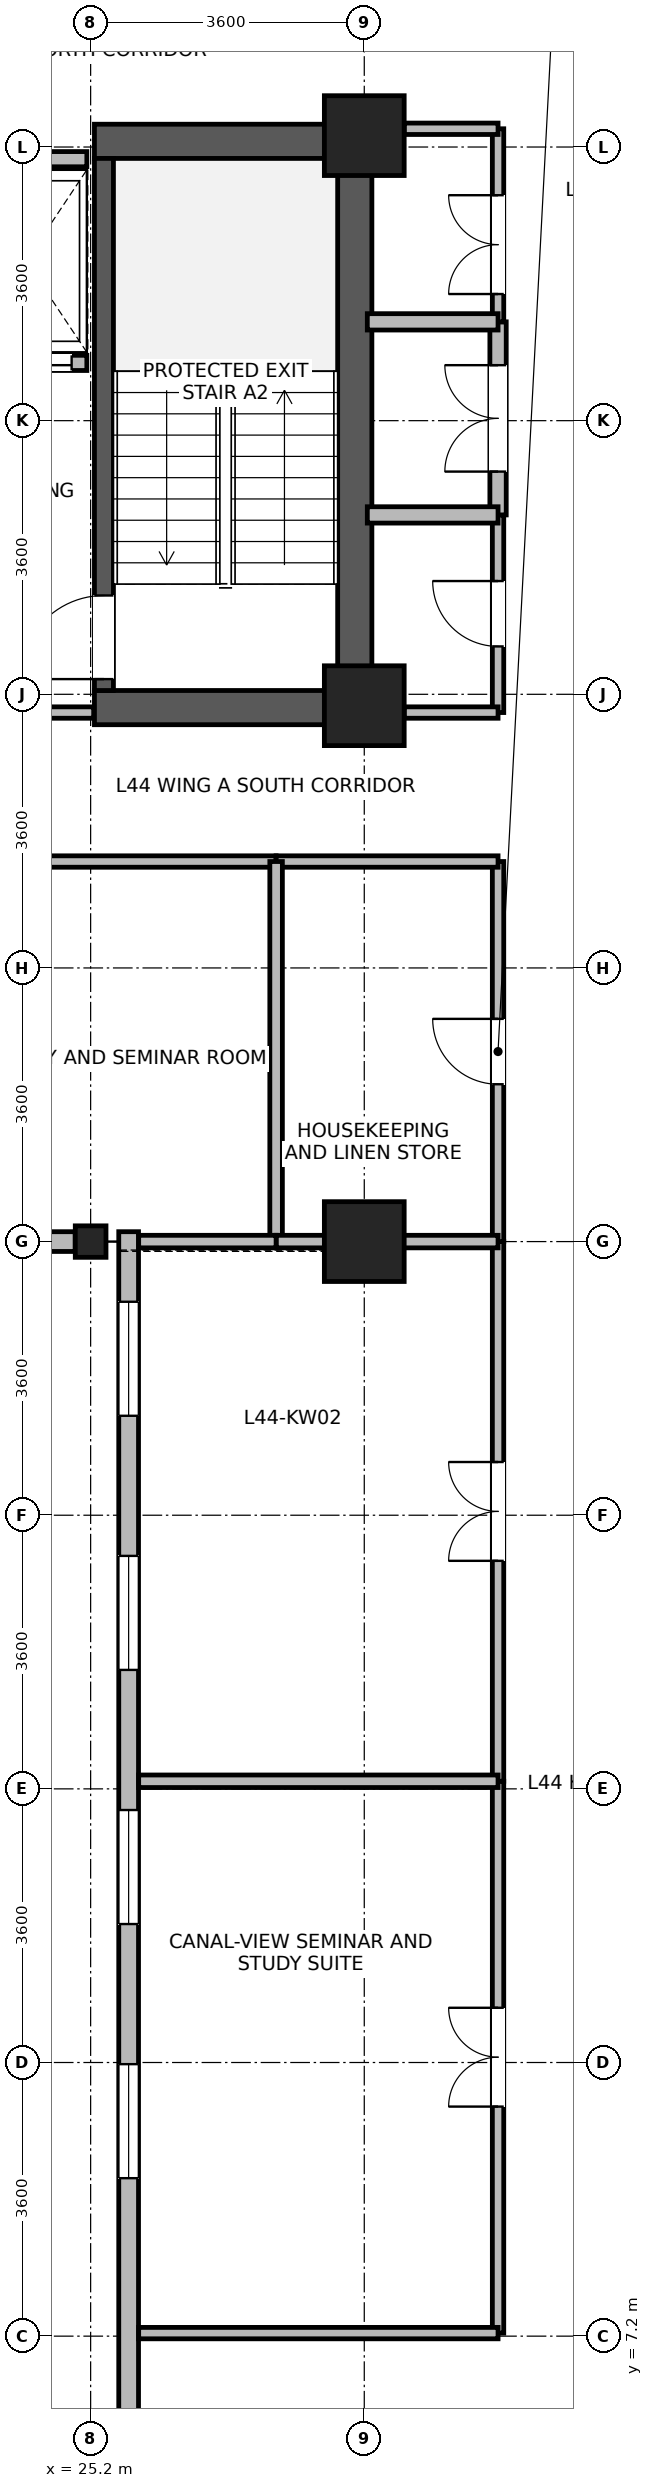
"""IFC4 building model, lengths in metres.
Left out: names, types, materials, properties, quantities, classifications, styles, units other than length and angle.
Written with IfcOpenShell. Run it as: python <this file> out.ifc"""

import sys

from ifc_helpers import new_model, si_unit, direction, frame, frame_2d, origin, origin_2d, place, context, subcontext, project, spatial, rectangle, i_section, extrude, source, transform, mapped, element, fill, save


model = new_model("IFC4")
c1 = context("Model", 3, precision=1e-05, world=origin(), true_north=direction((0.0, 1.0)))
c2 = subcontext(c1, "Body", "Model", "MODEL_VIEW")
j1 = project(units=[si_unit("LENGTHUNIT", "METRE"), si_unit("PLANEANGLEUNIT", "RADIAN")], contexts=[c1])
p1 = place(None, origin())
s1 = spatial("IfcSite", under=j1, at=p1, CompositionType="ELEMENT")
p2 = place(p1, origin())
s2 = spatial("IfcBuilding", under=s1, at=p2, CompositionType="ELEMENT")
p3 = place(p2, frame((0.0, 0.0, 173.5)))
s3 = spatial("IfcBuildingStorey", under=s2, at=p3, CompositionType="ELEMENT", Elevation=173.5)
p4 = place(p3, frame((28.675, 28.4, 0.0), z_axis=(0.0, 0.0, 1.0), x_axis=(0.0, 1.0, 0.0)))
e1 = element("IfcWall", 1, at=p4, inside=s3, PredefinedType="SHEAR", context=c2, shape_type="SweptSolid", body=[
    extrude(rectangle(XDim=7.9, YDim=0.45, at=frame_2d((3.95, 0.0))), origin(), (0.0, 0.0, 1.0), 3.46),
])
for number, where, z_axis, x_axis in (
    (2, (25.25, 28.625, 0.0), (0.0, 0.0, 1.0), (1.0, 0.0, 0.0)),
    (3, (25.25, 36.075, 0.0), (0.0, 0.0, 1.0), (1.0, 0.0, 0.0)),
):
    element("IfcWall", number, at=place(p3, frame(where, z_axis=z_axis, x_axis=x_axis)), inside=s3, PredefinedType="SHEAR", context=c2, shape_type="SweptSolid", body=[
        extrude(rectangle(XDim=3.2, YDim=0.45, at=frame_2d((1.6, 0.0))), origin(), (0.0, 0.0, 1.0), 3.46),
    ])
p5 = place(p3, frame((25.375, 28.85, 0.0), z_axis=(0.0, 0.0, 1.0), x_axis=(0.0, 1.0, 0.0)))
e4 = element("IfcWall", 4, at=p5, inside=s3, PredefinedType="SHEAR", context=c2, shape_type="SweptSolid", body=[
    extrude(rectangle(XDim=7.0, YDim=0.25, at=frame_2d((3.5, 0.0))), origin(), (0.0, 0.0, 1.0), 3.46),
])
p6 = place(p5, frame((0.15, 0.0, 0.0)))
e5 = element("IfcOpeningElement", 5, at=p6, cuts=e4, PredefinedType="OPENING", context=c2, shape_type="SweptSolid", body=[
    extrude(rectangle(XDim=1.1, YDim=2.08, at=frame_2d((0.55, 1.04))), frame((0.0, 0.135, 0.0), z_axis=(0.0, -1.0, 0.0), x_axis=(1.0, 0.0, 0.0)), (0.0, 0.0, 1.0), 0.27),
])
m1 = source(origin(), c2, "Body", "SweptSolid", [
    extrude(rectangle(XDim=1.05, YDim=1.05, at=origin_2d()), origin(), (0.0, 0.0, 1.0), 3.7),
])
for number, where, z_axis, x_axis in (
    (6, (28.8, 21.6, 0.0), (0.0, 0.0, 1.0), (1.0, 0.0, 0.0)),
    (7, (28.8, 28.65, 0.0), (0.0, 0.0, 1.0), (1.0, 0.0, 0.0)),
    (8, (28.8, 36.15, 0.0), (0.0, 0.0, 1.0), (1.0, 0.0, 0.0)),
):
    element("IfcColumn", number, at=place(p3, frame(where, z_axis=z_axis, x_axis=x_axis)), inside=s3, PredefinedType="COLUMN", context=c2, shape_type="MappedRepresentation", body=[
        mapped(m1, transform((0.0, 0.0, 0.0), x_axis=(1.0, 0.0, 0.0), y_axis=(0.0, 1.0, 0.0), z_axis=(0.0, 0.0, 1.0), scale=1.0)),
    ])
m2 = source(origin(), c2, "Body", "SweptSolid", [
    extrude(i_section(OverallWidth=0.404, OverallDepth=0.414, WebThickness=0.021, FlangeThickness=0.028, FilletRadius=0.015, at=origin_2d()), origin(), (0.0, 0.0, 1.0), 3.7),
])
p7 = place(p3, frame((25.2, 21.6, 0.0), z_axis=(0.0, 0.0, 1.0), x_axis=(1.0, 0.0, 0.0)))
e9 = element("IfcColumn", 9, at=p7, inside=s3, PredefinedType="COLUMN", context=c2, shape_type="MappedRepresentation", body=[
    mapped(m2, transform((0.0, 0.0, 0.0), x_axis=(1.0, 0.0, 0.0), y_axis=(0.0, 1.0, 0.0), z_axis=(0.0, 0.0, 1.0), scale=1.0)),
])
p8 = place(p3, frame((24.997, 21.6, 0.0), z_axis=(0.0, 0.0, 1.0), x_axis=(-1.0, 0.0, 0.0)))
e10 = element("IfcWall", 10, at=p8, inside=s3, PredefinedType="STANDARD", context=c2, shape_type="SweptSolid", body=[
    extrude(rectangle(XDim=2.871, YDim=0.26, at=frame_2d((1.436, 0.0))), origin(), (0.0, 0.0, 1.0), 2.99),
])
p9 = place(p8, frame((0.96, 0.0, 0.85)))
e11 = element("IfcOpeningElement", 11, at=p9, cuts=e10, PredefinedType="OPENING", context=c2, shape_type="SweptSolid", body=[
    extrude(rectangle(XDim=0.95, YDim=1.75, at=frame_2d((0.475, 0.875))), frame((0.0, 0.14, 0.0), z_axis=(0.0, -1.0, 0.0), x_axis=(1.0, 0.0, 0.0)), (0.0, 0.0, 1.0), 0.28),
])
p10 = place(p3, frame((25.7, 1.67, 0.0), z_axis=(0.0, 0.0, 1.0), x_axis=(0.0, 1.0, 0.0)))
e12 = element("IfcWall", 12, at=p10, inside=s3, PredefinedType="STANDARD", context=c2, shape_type="SweptSolid", body=[
    extrude(rectangle(XDim=20.06, YDim=0.26, at=frame_2d((10.03, 0.0))), origin(), (0.0, 0.0, 1.0), 3.44),
])
p11 = place(p10, frame((0.922, 0.0, 0.85)))
e13 = element("IfcOpeningElement", 13, at=p11, cuts=e12, PredefinedType="OPENING", context=c2, shape_type="SweptSolid", body=[
    extrude(rectangle(XDim=1.5, YDim=1.85, at=frame_2d((0.75, 0.925))), frame((0.0, 0.14, 0.0), z_axis=(0.0, -1.0, 0.0), x_axis=(1.0, 0.0, 0.0)), (0.0, 0.0, 1.0), 0.28),
])
p12 = place(p10, frame((7.608, 0.0, 0.85)))
e14 = element("IfcOpeningElement", 14, at=p12, cuts=e12, PredefinedType="OPENING", context=c2, shape_type="SweptSolid", body=[
    extrude(rectangle(XDim=1.5, YDim=1.85, at=frame_2d((0.75, 0.925))), frame((0.0, 0.14, 0.0), z_axis=(0.0, -1.0, 0.0), x_axis=(1.0, 0.0, 0.0)), (0.0, 0.0, 1.0), 0.28),
])
p13 = place(p10, frame((10.952, 0.0, 0.85)))
e15 = element("IfcOpeningElement", 15, at=p13, cuts=e12, PredefinedType="OPENING", context=c2, shape_type="SweptSolid", body=[
    extrude(rectangle(XDim=1.5, YDim=1.85, at=frame_2d((0.75, 0.925))), frame((0.0, 0.14, 0.0), z_axis=(0.0, -1.0, 0.0), x_axis=(1.0, 0.0, 0.0)), (0.0, 0.0, 1.0), 0.28),
])
p14 = place(p10, frame((14.295, 0.0, 0.85)))
e16 = element("IfcOpeningElement", 16, at=p14, cuts=e12, PredefinedType="OPENING", context=c2, shape_type="SweptSolid", body=[
    extrude(rectangle(XDim=1.5, YDim=1.85, at=frame_2d((0.75, 0.925))), frame((0.0, 0.14, 0.0), z_axis=(0.0, -1.0, 0.0), x_axis=(1.0, 0.0, 0.0)), (0.0, 0.0, 1.0), 0.28),
])
p15 = place(p10, frame((17.638, 0.0, 0.85)))
e17 = element("IfcOpeningElement", 17, at=p15, cuts=e12, PredefinedType="OPENING", context=c2, shape_type="SweptSolid", body=[
    extrude(rectangle(XDim=1.5, YDim=1.85, at=frame_2d((0.75, 0.925))), frame((0.0, 0.14, 0.0), z_axis=(0.0, -1.0, 0.0), x_axis=(1.0, 0.0, 0.0)), (0.0, 0.0, 1.0), 0.28),
])
p16 = place(p3, frame((23.55, 33.16, 0.0), z_axis=(0.0, 0.0, 1.0), x_axis=(1.0, 0.0, 0.0)))
e18 = element("IfcWall", 18, at=p16, inside=s3, PredefinedType="PARTITIONING", context=c2, shape_type="SweptSolid", body=[
    extrude(rectangle(XDim=1.6, YDim=0.2, at=frame_2d((0.8, 0.0))), origin(), (0.0, 0.0, 1.0), 3.44),
])
p17 = place(p16, frame((0.2, 0.0, 0.0)))
e19 = element("IfcOpeningElement", 19, at=p17, cuts=e18, PredefinedType="OPENING", context=c2, shape_type="SweptSolid", body=[
    extrude(rectangle(XDim=1.2, YDim=2.12, at=frame_2d((0.6, 1.06))), frame((0.0, 0.11, 0.0), z_axis=(0.0, -1.0, 0.0), x_axis=(1.0, 0.0, 0.0)), (0.0, 0.0, 1.0), 0.22),
])
p18 = place(p3, frame((23.55, 35.84, 0.0), z_axis=(0.0, 0.0, 1.0), x_axis=(1.0, 0.0, 0.0)))
e20 = element("IfcWall", 20, at=p18, inside=s3, PredefinedType="PARTITIONING", context=c2, shape_type="SweptSolid", body=[
    extrude(rectangle(XDim=1.6, YDim=0.2, at=frame_2d((0.8, 0.0))), origin(), (0.0, 0.0, 1.0), 2.44),
])
p19 = place(p3, frame((19.4, 26.6, 0.0), z_axis=(0.0, 0.0, 1.0), x_axis=(1.0, 0.0, 0.0)))
e21 = element("IfcWall", 21, at=p19, inside=s3, PredefinedType="PARTITIONING", context=c2, shape_type="SweptSolid", body=[
    extrude(rectangle(XDim=8.24, YDim=0.15, at=frame_2d((4.12, 0.0))), origin(), (0.0, 0.0, 1.0), 3.44),
])
p20 = place(p19, frame((3.47, 0.0, 0.0)))
e22 = element("IfcOpeningElement", 22, at=p20, cuts=e21, PredefinedType="OPENING", context=c2, shape_type="SweptSolid", body=[
    extrude(rectangle(XDim=1.3, YDim=2.12, at=frame_2d((0.65, 1.06))), frame((0.0, 0.085, 0.0), z_axis=(0.0, -1.0, 0.0), x_axis=(1.0, 0.0, 0.0)), (0.0, 0.0, 1.0), 0.17),
])
p21 = place(p3, frame((30.56, 7.24, 0.0), z_axis=(0.0, 0.0, 1.0), x_axis=(0.0, 1.0, 0.0)))
e23 = element("IfcWall", 23, at=p21, inside=s3, PredefinedType="PARTITIONING", context=c2, shape_type="SweptSolid", body=[
    extrude(rectangle(XDim=7.26, YDim=0.15, at=frame_2d((3.63, 0.0))), origin(), (0.0, 0.0, 1.0), 3.44),
])
p22 = place(p21, frame((2.98, 0.0, 0.0)))
e24 = element("IfcOpeningElement", 24, at=p22, cuts=e23, PredefinedType="OPENING", context=c2, shape_type="SweptSolid", body=[
    extrude(rectangle(XDim=1.3, YDim=2.12, at=frame_2d((0.65, 1.06))), frame((0.0, 0.085, 0.0), z_axis=(0.0, -1.0, 0.0), x_axis=(1.0, 0.0, 0.0)), (0.0, 0.0, 1.0), 0.17),
])
p23 = place(p3, frame((30.56, 14.5, 0.0), z_axis=(0.0, 0.0, 1.0), x_axis=(0.0, 1.0, 0.0)))
e25 = element("IfcWall", 25, at=p23, inside=s3, PredefinedType="PARTITIONING", context=c2, shape_type="SweptSolid", body=[
    extrude(rectangle(XDim=7.1, YDim=0.15, at=frame_2d((3.55, 0.0))), origin(), (0.0, 0.0, 1.0), 3.44),
])
p24 = place(p23, frame((2.9, 0.0, 0.0)))
e26 = element("IfcOpeningElement", 26, at=p24, cuts=e25, PredefinedType="OPENING", context=c2, shape_type="SweptSolid", body=[
    extrude(rectangle(XDim=1.3, YDim=2.12, at=frame_2d((0.65, 1.06))), frame((0.0, 0.085, 0.0), z_axis=(0.0, -1.0, 0.0), x_axis=(1.0, 0.0, 0.0)), (0.0, 0.0, 1.0), 0.17),
])
p25 = place(p3, frame((30.56, 21.6, 0.0), z_axis=(0.0, 0.0, 1.0), x_axis=(0.0, 1.0, 0.0)))
e27 = element("IfcWall", 27, at=p25, inside=s3, PredefinedType="PARTITIONING", context=c2, shape_type="SweptSolid", body=[
    extrude(rectangle(XDim=5.0, YDim=0.15, at=frame_2d((2.5, 0.0))), origin(), (0.0, 0.0, 1.0), 3.44),
])
p26 = place(p25, frame((2.07, 0.0, 0.0)))
e28 = element("IfcOpeningElement", 28, at=p26, cuts=e27, PredefinedType="OPENING", context=c2, shape_type="SweptSolid", body=[
    extrude(rectangle(XDim=0.86, YDim=2.02, at=frame_2d((0.43, 1.01))), frame((0.0, 0.085, 0.0), z_axis=(0.0, -1.0, 0.0), x_axis=(1.0, 0.0, 0.0)), (0.0, 0.0, 1.0), 0.17),
])
p27 = place(p3, frame((25.832, 7.24, 0.0), z_axis=(0.0, 0.0, 1.0), x_axis=(1.0, 0.0, 0.0)))
e29 = element("IfcWall", 29, at=p27, inside=s3, PredefinedType="PARTITIONING", context=c2, shape_type="SweptSolid", body=[
    extrude(rectangle(XDim=4.728, YDim=0.15, at=frame_2d((2.364, 0.0))), origin(), (0.0, 0.0, 1.0), 3.44),
])
p28 = place(p3, frame((27.64, 26.6, 0.0), z_axis=(0.0, 0.0, 1.0), x_axis=(1.0, 0.0, 0.0)))
e30 = element("IfcWall", 30, at=p28, inside=s3, PredefinedType="PARTITIONING", context=c2, shape_type="SweptSolid", body=[
    extrude(rectangle(XDim=2.92, YDim=0.15, at=frame_2d((1.46, 0.0))), origin(), (0.0, 0.0, 1.0), 3.44),
])
p29 = place(p3, frame((30.56, 28.56, 0.0), z_axis=(0.0, 0.0, 1.0), x_axis=(0.0, 1.0, 0.0)))
e31 = element("IfcWall", 31, at=p29, inside=s3, PredefinedType="PARTITIONING", context=c2, shape_type="SweptSolid", body=[
    extrude(rectangle(XDim=2.6, YDim=0.15, at=frame_2d((1.3, 0.0))), origin(), (0.0, 0.0, 1.0), 3.44),
])
p30 = place(p29, frame((0.87, 0.0, 0.0)))
e32 = element("IfcOpeningElement", 32, at=p30, cuts=e31, PredefinedType="OPENING", context=c2, shape_type="SweptSolid", body=[
    extrude(rectangle(XDim=0.86, YDim=2.02, at=frame_2d((0.43, 1.01))), frame((0.0, 0.085, 0.0), z_axis=(0.0, -1.0, 0.0), x_axis=(1.0, 0.0, 0.0)), (0.0, 0.0, 1.0), 0.17),
])
p31 = place(p3, frame((30.56, 31.16, 0.0), z_axis=(0.0, 0.0, 1.0), x_axis=(0.0, 1.0, 0.0)))
e33 = element("IfcWall", 33, at=p31, inside=s3, PredefinedType="PARTITIONING", context=c2, shape_type="SweptSolid", body=[
    extrude(rectangle(XDim=2.54, YDim=0.215, at=frame_2d((1.27, 0.0))), origin(), (0.0, 0.0, 1.0), 3.44),
])
p32 = place(p31, frame((0.57, 0.0, 0.0)))
e34 = element("IfcOpeningElement", 34, at=p32, cuts=e33, PredefinedType="OPENING", context=c2, shape_type="SweptSolid", body=[
    extrude(rectangle(XDim=1.4, YDim=2.15, at=frame_2d((0.7, 1.075))), frame((0.0, 0.118, 0.0), z_axis=(0.0, -1.0, 0.0), x_axis=(1.0, 0.0, 0.0)), (0.0, 0.0, 1.0), 0.235),
])
p33 = place(p3, frame((30.56, 33.7, 0.0), z_axis=(0.0, 0.0, 1.0), x_axis=(0.0, 1.0, 0.0)))
e35 = element("IfcWall", 35, at=p33, inside=s3, PredefinedType="PARTITIONING", context=c2, shape_type="SweptSolid", body=[
    extrude(rectangle(XDim=2.54, YDim=0.15, at=frame_2d((1.27, 0.0))), origin(), (0.0, 0.0, 1.0), 3.44),
])
p34 = place(p33, frame((0.366, 0.0, 0.0)))
e36 = element("IfcOpeningElement", 36, at=p34, cuts=e35, PredefinedType="OPENING", context=c2, shape_type="SweptSolid", body=[
    extrude(rectangle(XDim=1.3, YDim=2.12, at=frame_2d((0.65, 1.06))), frame((0.0, 0.085, 0.0), z_axis=(0.0, -1.0, 0.0), x_axis=(1.0, 0.0, 0.0)), (0.0, 0.0, 1.0), 0.17),
])
for number, where, z_axis, x_axis in (
    (37, (29.325, 28.56, 0.0), (0.0, 0.0, 1.0), (1.0, 0.0, 0.0)),
    (38, (29.325, 36.24, 0.0), (0.0, 0.0, 1.0), (1.0, 0.0, 0.0)),
):
    element("IfcWall", number, at=place(p3, frame(where, z_axis=z_axis, x_axis=x_axis)), inside=s3, PredefinedType="PARTITIONING", context=c2, shape_type="SweptSolid", body=[
        extrude(rectangle(XDim=1.235, YDim=0.15, at=frame_2d((0.618, 0.0))), origin(), (0.0, 0.0, 1.0), 2.84),
    ])
p35 = place(p3, frame((27.64, 21.6, 0.0), z_axis=(0.0, 0.0, 1.0), x_axis=(0.0, 1.0, 0.0)))
e39 = element("IfcWall", 39, at=p35, inside=s3, PredefinedType="PARTITIONING", context=c2, shape_type="SweptSolid", body=[
    extrude(rectangle(XDim=5.0, YDim=0.165, at=frame_2d((2.5, 0.0))), origin(), (0.0, 0.0, 1.0), 3.44),
])
p36 = place(p3, frame((25.832, 14.5, 0.0), z_axis=(0.0, 0.0, 1.0), x_axis=(1.0, 0.0, 0.0)))
e40 = element("IfcWall", 40, at=p36, inside=s3, PredefinedType="PARTITIONING", context=c2, shape_type="SweptSolid", body=[
    extrude(rectangle(XDim=4.728, YDim=0.165, at=frame_2d((2.364, 0.0))), origin(), (0.0, 0.0, 1.0), 3.44),
])
p37 = place(p3, frame((21.76, 28.56, 0.0), z_axis=(0.0, 0.0, 1.0), x_axis=(1.0, 0.0, 0.0)))
e41 = element("IfcWall", 41, at=p37, inside=s3, PredefinedType="PARTITIONING", context=c2, shape_type="SweptSolid", body=[
    extrude(rectangle(XDim=3.48, YDim=0.15, at=frame_2d((1.74, 0.0))), origin(), (0.0, 0.0, 1.0), 2.44),
])
p38 = place(p37, frame((0.99, 0.0, 0.0)))
e42 = element("IfcOpeningElement", 42, at=p38, cuts=e41, PredefinedType="OPENING", context=c2, shape_type="SweptSolid", body=[
    extrude(rectangle(XDim=1.5, YDim=2.1, at=frame_2d((0.75, 1.05))), frame((0.0, 0.085, 0.0), z_axis=(0.0, -1.0, 0.0), x_axis=(1.0, 0.0, 0.0)), (0.0, 0.0, 1.0), 0.17),
])
p39 = place(p3, frame((27.64, 21.6, 0.0), z_axis=(0.0, 0.0, 1.0), x_axis=(1.0, 0.0, 0.0)))
e43 = element("IfcWall", 43, at=p39, inside=s3, PredefinedType="PARTITIONING", context=c2, shape_type="SweptSolid", body=[
    extrude(rectangle(XDim=2.92, YDim=0.165, at=frame_2d((1.46, 0.0))), origin(), (0.0, 0.0, 1.0), 2.99),
])
p40 = place(p3, frame((25.832, 21.6, 0.0), z_axis=(0.0, 0.0, 1.0), x_axis=(1.0, 0.0, 0.0)))
e44 = element("IfcWall", 44, at=p40, inside=s3, PredefinedType="PARTITIONING", context=c2, shape_type="SweptSolid", body=[
    extrude(rectangle(XDim=1.808, YDim=0.165, at=frame_2d((0.904, 0.0))), origin(), (0.0, 0.0, 1.0), 2.99),
])
for number, where, z_axis, x_axis in (
    (45, (28.84, 31.16, 0.0), (0.0, 0.0, 1.0), (1.0, 0.0, 0.0)),
    (46, (28.84, 33.7, 0.0), (0.0, 0.0, 1.0), (1.0, 0.0, 0.0)),
):
    element("IfcWall", number, at=place(p3, frame(where, z_axis=z_axis, x_axis=x_axis)), inside=s3, PredefinedType="PARTITIONING", context=c2, shape_type="SweptSolid", body=[
        extrude(rectangle(XDim=1.72, YDim=0.215, at=frame_2d((0.86, 0.0))), origin(), (0.0, 0.0, 1.0), 3.44),
    ])
p41 = place(p12, origin())
e47 = element("IfcWindow", 47, at=p41, inside=s3, PartitioningType="SINGLE_PANEL", PredefinedType="WINDOW", context=c2, shape_type="SweptSolid", body=[
    extrude(rectangle(XDim=1.5, YDim=1.85, at=frame_2d((0.75, 0.925))), frame((0.0, 0.03, 0.0), z_axis=(0.0, -1.0, 0.0), x_axis=(1.0, 0.0, 0.0)), (0.0, 0.0, 1.0), 0.06),
])
fill(e14, e47)
p42 = place(p13, origin())
e48 = element("IfcWindow", 48, at=p42, inside=s3, PartitioningType="SINGLE_PANEL", PredefinedType="WINDOW", context=c2, shape_type="SweptSolid", body=[
    extrude(rectangle(XDim=1.5, YDim=1.85, at=frame_2d((0.75, 0.925))), frame((0.0, 0.03, 0.0), z_axis=(0.0, -1.0, 0.0), x_axis=(1.0, 0.0, 0.0)), (0.0, 0.0, 1.0), 0.06),
])
fill(e15, e48)
p43 = place(p14, origin())
e49 = element("IfcWindow", 49, at=p43, inside=s3, PartitioningType="SINGLE_PANEL", PredefinedType="WINDOW", context=c2, shape_type="SweptSolid", body=[
    extrude(rectangle(XDim=1.5, YDim=1.85, at=frame_2d((0.75, 0.925))), frame((0.0, 0.03, 0.0), z_axis=(0.0, -1.0, 0.0), x_axis=(1.0, 0.0, 0.0)), (0.0, 0.0, 1.0), 0.06),
])
fill(e16, e49)
p44 = place(p15, origin())
e50 = element("IfcWindow", 50, at=p44, inside=s3, PartitioningType="SINGLE_PANEL", PredefinedType="WINDOW", context=c2, shape_type="SweptSolid", body=[
    extrude(rectangle(XDim=1.5, YDim=1.85, at=frame_2d((0.75, 0.925))), frame((0.0, 0.03, 0.0), z_axis=(0.0, -1.0, 0.0), x_axis=(1.0, 0.0, 0.0)), (0.0, 0.0, 1.0), 0.06),
])
fill(e17, e50)
p45 = place(p6, origin())
e51 = element("IfcDoor", 51, at=p45, inside=s3, OperationType="SINGLE_SWING_LEFT", PredefinedType="DOOR", context=c2, shape_type="SweptSolid", body=[
    extrude(rectangle(XDim=1.1, YDim=2.08, at=frame_2d((0.55, 1.04))), frame((0.0, 0.025, 0.0), z_axis=(0.0, -1.0, 0.0), x_axis=(1.0, 0.0, 0.0)), (0.0, 0.0, 1.0), 0.05),
])
fill(e5, e51)
p46 = place(p17, origin())
e52 = element("IfcDoor", 52, at=p46, inside=s3, OperationType="SLIDING_TO_RIGHT", PredefinedType="DOOR", context=c2, shape_type="SweptSolid", body=[
    extrude(rectangle(XDim=1.2, YDim=2.12, at=frame_2d((0.6, 1.06))), frame((0.0, 0.025, 0.0), z_axis=(0.0, -1.0, 0.0), x_axis=(1.0, 0.0, 0.0)), (0.0, 0.0, 1.0), 0.05),
])
fill(e19, e52)
p47 = place(p22, origin())
e53 = element("IfcDoor", 53, at=p47, inside=s3, OperationType="DOUBLE_DOOR_SINGLE_SWING", PredefinedType="DOOR", context=c2, shape_type="SweptSolid", body=[
    extrude(rectangle(XDim=1.3, YDim=2.12, at=frame_2d((0.65, 1.06))), frame((0.0, 0.025, 0.0), z_axis=(0.0, -1.0, 0.0), x_axis=(1.0, 0.0, 0.0)), (0.0, 0.0, 1.0), 0.05),
])
fill(e24, e53)
p48 = place(p24, origin())
e54 = element("IfcDoor", 54, at=p48, inside=s3, OperationType="DOUBLE_DOOR_SINGLE_SWING", PredefinedType="DOOR", context=c2, shape_type="SweptSolid", body=[
    extrude(rectangle(XDim=1.3, YDim=2.12, at=frame_2d((0.65, 1.06))), frame((0.0, 0.025, 0.0), z_axis=(0.0, -1.0, 0.0), x_axis=(1.0, 0.0, 0.0)), (0.0, 0.0, 1.0), 0.05),
])
fill(e26, e54)
p49 = place(p26, origin())
e55 = element("IfcDoor", 55, at=p49, inside=s3, OperationType="SINGLE_SWING_RIGHT", PredefinedType="DOOR", context=c2, shape_type="SweptSolid", body=[
    extrude(rectangle(XDim=0.86, YDim=2.02, at=frame_2d((0.43, 1.01))), frame((0.0, 0.025, 0.0), z_axis=(0.0, -1.0, 0.0), x_axis=(1.0, 0.0, 0.0)), (0.0, 0.0, 1.0), 0.05),
])
fill(e28, e55)
p50 = place(p30, origin())
e56 = element("IfcDoor", 56, at=p50, inside=s3, OperationType="SINGLE_SWING_RIGHT", PredefinedType="DOOR", context=c2, shape_type="SweptSolid", body=[
    extrude(rectangle(XDim=0.86, YDim=2.02, at=frame_2d((0.43, 1.01))), frame((0.0, 0.025, 0.0), z_axis=(0.0, -1.0, 0.0), x_axis=(1.0, 0.0, 0.0)), (0.0, 0.0, 1.0), 0.05),
])
fill(e32, e56)
p51 = place(p32, origin())
e57 = element("IfcDoor", 57, at=p51, inside=s3, OperationType="DOUBLE_DOOR_SINGLE_SWING", PredefinedType="DOOR", context=c2, shape_type="SweptSolid", body=[
    extrude(rectangle(XDim=1.4, YDim=2.15, at=frame_2d((0.7, 1.075))), frame((0.0, 0.025, 0.0), z_axis=(0.0, -1.0, 0.0), x_axis=(1.0, 0.0, 0.0)), (0.0, 0.0, 1.0), 0.05),
])
fill(e34, e57)
p52 = place(p34, origin())
e58 = element("IfcDoor", 58, at=p52, inside=s3, OperationType="DOUBLE_DOOR_SINGLE_SWING", PredefinedType="DOOR", context=c2, shape_type="SweptSolid", body=[
    extrude(rectangle(XDim=1.3, YDim=2.12, at=frame_2d((0.65, 1.06))), frame((0.0, 0.025, 0.0), z_axis=(0.0, -1.0, 0.0), x_axis=(1.0, 0.0, 0.0)), (0.0, 0.0, 1.0), 0.05),
])
fill(e36, e58)
save(model, sys.argv[1])
